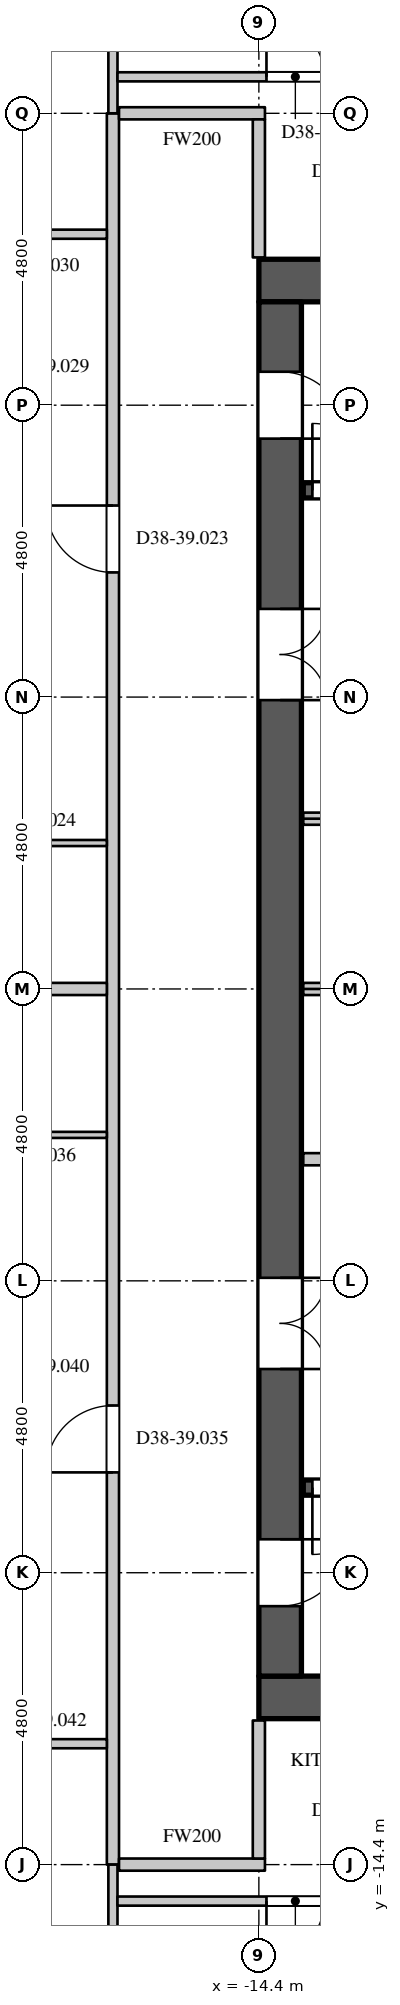
"""IFC4 building model, lengths in metres.
Left out: names, types, materials, properties, quantities, classifications, styles, units other than length and angle.
Written with IfcOpenShell. Run it as: python <this file> out.ifc"""

import sys

from ifc_helpers import new_model, si_unit, direction, frame, frame_2d, origin, place, context, subcontext, project, spatial, rectangle, extrude, element, fill, save


model = new_model("IFC4")
c1 = context("Model", 3, precision=1e-05, world=origin(), true_north=direction((0.0, 1.0)))
c2 = subcontext(c1, "Body", "Model", "MODEL_VIEW")
j1 = project(units=[si_unit("LENGTHUNIT", "METRE"), si_unit("PLANEANGLEUNIT", "RADIAN")], contexts=[c1])
p1 = place(None, origin())
s1 = spatial("IfcSite", under=j1, at=p1, CompositionType="ELEMENT")
p2 = place(p1, origin())
s2 = spatial("IfcBuilding", under=s1, at=p2, CompositionType="ELEMENT")
p3 = place(p2, frame((0.0, 0.0, 166.5)))
s3 = spatial("IfcBuildingStorey", under=s2, at=p3, CompositionType="ELEMENT", Elevation=166.5)
for number, where, z_axis, x_axis in (
    (1, (-14.4, 11.65, 0.0), (0.0, 0.0, 1.0), (1.0, 0.0, 0.0)),
    (2, (-14.4, -11.65, 0.0), (0.0, 0.0, 1.0), (1.0, 0.0, 0.0)),
):
    element("IfcWall", number, at=place(p3, frame(where, z_axis=z_axis, x_axis=x_axis)), inside=s3, PredefinedType="SHEAR", context=c2, shape_type="SweptSolid", body=[
        extrude(rectangle(XDim=28.8, YDim=0.7, at=frame_2d((14.4, 0.0))), origin(), (0.0, 0.0, 1.0), 4.2),
    ])
p4 = place(p3, frame((-14.05, -11.3, 0.0), z_axis=(0.0, 0.0, 1.0), x_axis=(0.0, 1.0, 0.0)))
e3 = element("IfcWall", 3, at=p4, inside=s3, PredefinedType="SHEAR", context=c2, shape_type="SweptSolid", body=[
    extrude(rectangle(XDim=22.6, YDim=0.7, at=frame_2d((11.3, 0.0))), origin(), (0.0, 0.0, 1.0), 4.2),
])
p5 = place(p4, frame((20.35, 0.0, 0.0)))
e4 = element("IfcOpeningElement", 4, at=p5, cuts=e3, PredefinedType="OPENING", context=c2, shape_type="SweptSolid", body=[
    extrude(rectangle(XDim=1.1, YDim=2.2, at=frame_2d((0.55, 1.1))), frame((0.0, 0.36, 0.0), z_axis=(0.0, -1.0, 0.0), x_axis=(1.0, 0.0, 0.0)), (0.0, 0.0, 1.0), 0.72),
])
p6 = place(p4, frame((1.15, 0.0, 0.0)))
e5 = element("IfcOpeningElement", 5, at=p6, cuts=e3, PredefinedType="OPENING", context=c2, shape_type="SweptSolid", body=[
    extrude(rectangle(XDim=1.1, YDim=2.2, at=frame_2d((0.55, 1.1))), frame((0.0, 0.36, 0.0), z_axis=(0.0, -1.0, 0.0), x_axis=(1.0, 0.0, 0.0)), (0.0, 0.0, 1.0), 0.72),
])
p7 = place(p4, frame((16.05, 0.0, 0.0)))
e6 = element("IfcOpeningElement", 6, at=p7, cuts=e3, PredefinedType="OPENING", context=c2, shape_type="SweptSolid", body=[
    extrude(rectangle(XDim=1.5, YDim=2.4, at=frame_2d((0.75, 1.2))), frame((0.0, 0.36, 0.0), z_axis=(0.0, -1.0, 0.0), x_axis=(1.0, 0.0, 0.0)), (0.0, 0.0, 1.0), 0.72),
])
p8 = place(p4, frame((5.05, 0.0, 0.0)))
e7 = element("IfcOpeningElement", 7, at=p8, cuts=e3, PredefinedType="OPENING", context=c2, shape_type="SweptSolid", body=[
    extrude(rectangle(XDim=1.5, YDim=2.4, at=frame_2d((0.75, 1.2))), frame((0.0, 0.36, 0.0), z_axis=(0.0, -1.0, 0.0), x_axis=(1.0, 0.0, 0.0)), (0.0, 0.0, 1.0), 0.72),
])
p9 = place(p3, frame((-16.8, -14.4, 0.0), z_axis=(0.0, 0.0, 1.0), x_axis=(0.0, 1.0, 0.0)))
e8 = element("IfcWall", 8, at=p9, inside=s3, PredefinedType="PARTITIONING", context=c2, shape_type="SweptSolid", body=[
    extrude(rectangle(XDim=28.8, YDim=0.2, at=frame_2d((14.4, 0.0))), origin(), (0.0, 0.0, 1.0), 3.95),
])
p10 = place(p9, frame((21.25, 0.0, 0.0)))
e9 = element("IfcOpeningElement", 9, at=p10, cuts=e8, PredefinedType="OPENING", context=c2, shape_type="SweptSolid", body=[
    extrude(rectangle(XDim=1.1, YDim=2.4, at=frame_2d((0.55, 1.2))), frame((0.0, 0.11, 0.0), z_axis=(0.0, -1.0, 0.0), x_axis=(1.0, 0.0, 0.0)), (0.0, 0.0, 1.0), 0.22),
])
p11 = place(p9, frame((6.45, 0.0, 0.0)))
e10 = element("IfcOpeningElement", 10, at=p11, cuts=e8, PredefinedType="OPENING", context=c2, shape_type="SweptSolid", body=[
    extrude(rectangle(XDim=1.1, YDim=2.4, at=frame_2d((0.55, 1.2))), frame((0.0, 0.11, 0.0), z_axis=(0.0, -1.0, 0.0), x_axis=(1.0, 0.0, 0.0)), (0.0, 0.0, 1.0), 0.22),
])
for number, where, z_axis, x_axis in (
    (11, (-16.7, -14.4, 0.0), (0.0, 0.0, 1.0), (1.0, 0.0, 0.0)),
    (12, (-16.7, 14.4, 0.0), (0.0, 0.0, 1.0), (1.0, 0.0, 0.0)),
):
    element("IfcWall", number, at=place(p3, frame(where, z_axis=z_axis, x_axis=x_axis)), inside=s3, PredefinedType="PARTITIONING", context=c2, shape_type="SweptSolid", body=[
        extrude(rectangle(XDim=2.4, YDim=0.2, at=frame_2d((1.2, 0.0))), origin(), (0.0, 0.0, 1.0), 3.95),
    ])
for number, where, z_axis, x_axis in (
    (13, (-14.4, -14.3, 0.0), (0.0, 0.0, 1.0), (0.0, 1.0, 0.0)),
    (14, (-14.4, 12.03, 0.0), (0.0, 0.0, 1.0), (0.0, 1.0, 0.0)),
):
    element("IfcWall", number, at=place(p3, frame(where, z_axis=z_axis, x_axis=x_axis)), inside=s3, PredefinedType="PARTITIONING", context=c2, shape_type="SweptSolid", body=[
        extrude(rectangle(XDim=2.27, YDim=0.2, at=frame_2d((1.135, 0.0))), origin(), (0.0, 0.0, 1.0), 3.95),
    ])
p12 = place(p3, frame((-22.538, -12.412, 0.0), z_axis=(0.0, 0.0, 1.0), x_axis=(1.0, 0.0, 0.0)))
e15 = element("IfcWall", 15, at=p12, inside=s3, PredefinedType="PARTITIONING", context=c2, shape_type="SweptSolid", body=[
    extrude(rectangle(XDim=5.638, YDim=0.15, at=frame_2d((2.819, 0.0))), origin(), (0.0, 0.0, 1.0), 3.95),
])
p13 = place(p12, frame((3.419, 0.0, 0.0)))
e16 = element("IfcOpeningElement", 16, at=p13, cuts=e15, PredefinedType="OPENING", context=c2, shape_type="SweptSolid", body=[
    extrude(rectangle(XDim=0.95, YDim=2.2, at=frame_2d((0.475, 1.1))), frame((0.0, 0.085, 0.0), z_axis=(0.0, -1.0, 0.0), x_axis=(1.0, 0.0, 0.0)), (0.0, 0.0, 1.0), 0.17),
])
p14 = place(p3, frame((-22.538, 12.412, 0.0), z_axis=(0.0, 0.0, 1.0), x_axis=(1.0, 0.0, 0.0)))
e17 = element("IfcWall", 17, at=p14, inside=s3, PredefinedType="PARTITIONING", context=c2, shape_type="SweptSolid", body=[
    extrude(rectangle(XDim=5.638, YDim=0.15, at=frame_2d((2.819, 0.0))), origin(), (0.0, 0.0, 1.0), 3.95),
])
p15 = place(p14, frame((3.419, 0.0, 0.0)))
e18 = element("IfcOpeningElement", 18, at=p15, cuts=e17, PredefinedType="OPENING", context=c2, shape_type="SweptSolid", body=[
    extrude(rectangle(XDim=0.95, YDim=2.2, at=frame_2d((0.475, 1.1))), frame((0.0, 0.085, 0.0), z_axis=(0.0, -1.0, 0.0), x_axis=(1.0, 0.0, 0.0)), (0.0, 0.0, 1.0), 0.17),
])
p16 = place(p3, frame((-16.8, -18.131, 0.0), z_axis=(0.0, 0.0, 1.0), x_axis=(0.0, 1.0, 0.0)))
e19 = element("IfcWall", 19, at=p16, inside=s3, PredefinedType="PARTITIONING", context=c2, shape_type="SweptSolid", body=[
    extrude(rectangle(XDim=3.731, YDim=0.15, at=frame_2d((1.865, 0.0))), origin(), (0.0, 0.0, 1.0), 3.95),
])
p17 = place(p16, frame((1.15, 0.0, 0.0)))
e20 = element("IfcOpeningElement", 20, at=p17, cuts=e19, PredefinedType="OPENING", context=c2, shape_type="SweptSolid", body=[
    extrude(rectangle(XDim=0.95, YDim=2.2, at=frame_2d((0.475, 1.1))), frame((0.0, 0.085, 0.0), z_axis=(0.0, -1.0, 0.0), x_axis=(1.0, 0.0, 0.0)), (0.0, 0.0, 1.0), 0.17),
])
p18 = place(p3, frame((-16.725, -15.0, 0.0), z_axis=(0.0, 0.0, 1.0), x_axis=(1.0, 0.0, 0.0)))
e21 = element("IfcWall", 21, at=p18, inside=s3, PredefinedType="PARTITIONING", context=c2, shape_type="SweptSolid", body=[
    extrude(rectangle(XDim=5.051, YDim=0.15, at=frame_2d((2.525, 0.0))), origin(), (0.0, 0.0, 1.0), 3.95),
])
p19 = place(p18, frame((2.45, 0.0, 0.0)))
e22 = element("IfcOpeningElement", 22, at=p19, cuts=e21, PredefinedType="OPENING", context=c2, shape_type="SweptSolid", body=[
    extrude(rectangle(XDim=0.95, YDim=2.2, at=frame_2d((0.475, 1.1))), frame((0.0, 0.085, 0.0), z_axis=(0.0, -1.0, 0.0), x_axis=(1.0, 0.0, 0.0)), (0.0, 0.0, 1.0), 0.17),
])
p20 = place(p3, frame((-16.8, 14.4, 0.0), z_axis=(0.0, 0.0, 1.0), x_axis=(0.0, 1.0, 0.0)))
e23 = element("IfcWall", 23, at=p20, inside=s3, PredefinedType="PARTITIONING", context=c2, shape_type="SweptSolid", body=[
    extrude(rectangle(XDim=3.731, YDim=0.15, at=frame_2d((1.865, 0.0))), origin(), (0.0, 0.0, 1.0), 3.95),
])
p21 = place(p20, frame((1.6, 0.0, 0.0)))
e24 = element("IfcOpeningElement", 24, at=p21, cuts=e23, PredefinedType="OPENING", context=c2, shape_type="SweptSolid", body=[
    extrude(rectangle(XDim=0.95, YDim=2.2, at=frame_2d((0.475, 1.1))), frame((0.0, 0.085, 0.0), z_axis=(0.0, -1.0, 0.0), x_axis=(1.0, 0.0, 0.0)), (0.0, 0.0, 1.0), 0.17),
])
p22 = place(p3, frame((-16.725, 15.0, 0.0), z_axis=(0.0, 0.0, 1.0), x_axis=(1.0, 0.0, 0.0)))
e25 = element("IfcWall", 25, at=p22, inside=s3, PredefinedType="PARTITIONING", context=c2, shape_type="SweptSolid", body=[
    extrude(rectangle(XDim=5.051, YDim=0.15, at=frame_2d((2.525, 0.0))), origin(), (0.0, 0.0, 1.0), 3.95),
])
p23 = place(p22, frame((2.45, 0.0, 0.0)))
e26 = element("IfcOpeningElement", 26, at=p23, cuts=e25, PredefinedType="OPENING", context=c2, shape_type="SweptSolid", body=[
    extrude(rectangle(XDim=0.95, YDim=2.2, at=frame_2d((0.475, 1.1))), frame((0.0, 0.085, 0.0), z_axis=(0.0, -1.0, 0.0), x_axis=(1.0, 0.0, 0.0)), (0.0, 0.0, 1.0), 0.17),
])
p24 = place(p3, frame((-24.055, 0.0, 0.0), z_axis=(0.0, 0.0, 1.0), x_axis=(1.0, 0.0, 0.0)))
e27 = element("IfcWall", 27, at=p24, inside=s3, PredefinedType="PARTITIONING", context=c2, shape_type="SweptSolid", body=[
    extrude(rectangle(XDim=7.155, YDim=0.2, at=frame_2d((3.578, 0.0))), origin(), (0.0, 0.0, 1.0), 3.95),
])
p25 = place(p3, frame((-13.67, -2.8, 0.0), z_axis=(0.0, 0.0, 1.0), x_axis=(1.0, 0.0, 0.0)))
e28 = element("IfcWall", 28, at=p25, inside=s3, PredefinedType="PARTITIONING", context=c2, shape_type="SweptSolid", body=[
    extrude(rectangle(XDim=3.27, YDim=0.2, at=frame_2d((1.635, 0.0))), origin(), (0.0, 0.0, 1.0), 3.95),
])
p26 = place(p25, frame((1.3, 0.0, 0.0)))
e29 = element("IfcOpeningElement", 29, at=p26, cuts=e28, PredefinedType="OPENING", context=c2, shape_type="SweptSolid", body=[
    extrude(rectangle(XDim=0.6, YDim=2.0, at=frame_2d((0.3, 1.0))), frame((0.0, 0.11, 0.0), z_axis=(0.0, -1.0, 0.0), x_axis=(1.0, 0.0, 0.0)), (0.0, 0.0, 1.0), 0.22),
])
p27 = place(p3, frame((-13.67, 0.0, 0.0), z_axis=(0.0, 0.0, 1.0), x_axis=(1.0, 0.0, 0.0)))
e30 = element("IfcWall", 30, at=p27, inside=s3, PredefinedType="PARTITIONING", context=c2, shape_type="SweptSolid", body=[
    extrude(rectangle(XDim=21.47, YDim=0.2, at=frame_2d((10.735, 0.0))), origin(), (0.0, 0.0, 1.0), 3.95),
])
p28 = place(p3, frame((-13.67, 2.8, 0.0), z_axis=(0.0, 0.0, 1.0), x_axis=(1.0, 0.0, 0.0)))
e31 = element("IfcWall", 31, at=p28, inside=s3, PredefinedType="PARTITIONING", context=c2, shape_type="SweptSolid", body=[
    extrude(rectangle(XDim=5.85, YDim=0.2, at=frame_2d((2.925, 0.0))), origin(), (0.0, 0.0, 1.0), 3.95),
])
p29 = place(p28, frame((1.05, 0.0, 0.0)))
e32 = element("IfcOpeningElement", 32, at=p29, cuts=e31, PredefinedType="OPENING", context=c2, shape_type="SweptSolid", body=[
    extrude(rectangle(XDim=1.1, YDim=2.2, at=frame_2d((0.55, 1.1))), frame((0.0, 0.11, 0.0), z_axis=(0.0, -1.0, 0.0), x_axis=(1.0, 0.0, 0.0)), (0.0, 0.0, 1.0), 0.22),
])
p30 = place(p28, frame((4.0, 0.0, 0.0)))
e33 = element("IfcOpeningElement", 33, at=p30, cuts=e31, PredefinedType="OPENING", context=c2, shape_type="SweptSolid", body=[
    extrude(rectangle(XDim=1.1, YDim=2.2, at=frame_2d((0.55, 1.1))), frame((0.0, 0.11, 0.0), z_axis=(0.0, -1.0, 0.0), x_axis=(1.0, 0.0, 0.0)), (0.0, 0.0, 1.0), 0.22),
])
p31 = place(p3, frame((-13.67, -8.2, 0.0), z_axis=(0.0, 0.0, 1.0), x_axis=(1.0, 0.0, 0.0)))
e34 = element("IfcWall", 34, at=p31, inside=s3, PredefinedType="SHEAR", context=c2, shape_type="SweptSolid", body=[
    extrude(rectangle(XDim=8.395, YDim=0.25, at=frame_2d((4.198, 0.0))), origin(), (0.0, 0.0, 1.0), 3.95),
])
p32 = place(p31, frame((0.15, 0.0, 0.0)))
e35 = element("IfcOpeningElement", 35, at=p32, cuts=e34, PredefinedType="OPENING", context=c2, shape_type="SweptSolid", body=[
    extrude(rectangle(XDim=1.1, YDim=2.2, at=frame_2d((0.55, 1.1))), frame((0.0, 0.135, 0.0), z_axis=(0.0, -1.0, 0.0), x_axis=(1.0, 0.0, 0.0)), (0.0, 0.0, 1.0), 0.27),
])
p33 = place(p3, frame((-13.67, 8.2, 0.0), z_axis=(0.0, 0.0, 1.0), x_axis=(1.0, 0.0, 0.0)))
e36 = element("IfcWall", 36, at=p33, inside=s3, PredefinedType="SHEAR", context=c2, shape_type="SweptSolid", body=[
    extrude(rectangle(XDim=8.395, YDim=0.25, at=frame_2d((4.198, 0.0))), origin(), (0.0, 0.0, 1.0), 3.95),
])
p34 = place(p33, frame((0.15, 0.0, 0.0)))
e37 = element("IfcOpeningElement", 37, at=p34, cuts=e36, PredefinedType="OPENING", context=c2, shape_type="SweptSolid", body=[
    extrude(rectangle(XDim=1.1, YDim=2.2, at=frame_2d((0.55, 1.1))), frame((0.0, 0.135, 0.0), z_axis=(0.0, -1.0, 0.0), x_axis=(1.0, 0.0, 0.0)), (0.0, 0.0, 1.0), 0.27),
])
p35 = place(p3, frame((-20.125, -2.4, 0.0), z_axis=(0.0, 0.0, 1.0), x_axis=(1.0, 0.0, 0.0)))
e38 = element("IfcWall", 38, at=p35, inside=s3, PredefinedType="PARTITIONING", context=c2, shape_type="SweptSolid", body=[
    extrude(rectangle(XDim=3.225, YDim=0.1, at=frame_2d((1.613, 0.0))), origin(), (0.0, 0.0, 1.0), 3.95),
])
p36 = place(p35, frame((1.15, 0.0, 0.0)))
e39 = element("IfcOpeningElement", 39, at=p36, cuts=e38, PredefinedType="OPENING", context=c2, shape_type="SweptSolid", body=[
    extrude(rectangle(XDim=0.9, YDim=2.2, at=frame_2d((0.45, 1.1))), frame((0.0, 0.06, 0.0), z_axis=(0.0, -1.0, 0.0), x_axis=(1.0, 0.0, 0.0)), (0.0, 0.0, 1.0), 0.12),
])
p37 = place(p3, frame((-20.125, 2.4, 0.0), z_axis=(0.0, 0.0, 1.0), x_axis=(1.0, 0.0, 0.0)))
e40 = element("IfcWall", 40, at=p37, inside=s3, PredefinedType="PARTITIONING", context=c2, shape_type="SweptSolid", body=[
    extrude(rectangle(XDim=3.225, YDim=0.1, at=frame_2d((1.613, 0.0))), origin(), (0.0, 0.0, 1.0), 3.95),
])
p38 = place(p37, frame((1.15, 0.0, 0.0)))
e41 = element("IfcOpeningElement", 41, at=p38, cuts=e40, PredefinedType="OPENING", context=c2, shape_type="SweptSolid", body=[
    extrude(rectangle(XDim=0.9, YDim=2.2, at=frame_2d((0.45, 1.1))), frame((0.0, 0.06, 0.0), z_axis=(0.0, -1.0, 0.0), x_axis=(1.0, 0.0, 0.0)), (0.0, 0.0, 1.0), 0.12),
])
p39 = place(p34, origin())
e42 = element("IfcDoor", 42, at=p39, inside=s3, OperationType="SINGLE_SWING_LEFT", PredefinedType="DOOR", context=c2, shape_type="SweptSolid", body=[
    extrude(rectangle(XDim=1.1, YDim=2.2, at=frame_2d((0.55, 1.1))), frame((0.0, 0.025, 0.0), z_axis=(0.0, -1.0, 0.0), x_axis=(1.0, 0.0, 0.0)), (0.0, 0.0, 1.0), 0.05),
])
fill(e37, e42)
p40 = place(p32, origin())
e43 = element("IfcDoor", 43, at=p40, inside=s3, OperationType="SINGLE_SWING_RIGHT", PredefinedType="DOOR", context=c2, shape_type="SweptSolid", body=[
    extrude(rectangle(XDim=1.1, YDim=2.2, at=frame_2d((0.55, 1.1))), frame((0.0, 0.025, 0.0), z_axis=(0.0, -1.0, 0.0), x_axis=(1.0, 0.0, 0.0)), (0.0, 0.0, 1.0), 0.05),
])
fill(e35, e43)
p41 = place(p5, origin())
e44 = element("IfcDoor", 44, at=p41, inside=s3, OperationType="SINGLE_SWING_RIGHT", PredefinedType="DOOR", context=c2, shape_type="SweptSolid", body=[
    extrude(rectangle(XDim=1.1, YDim=2.2, at=frame_2d((0.55, 1.1))), frame((0.0, -0.295, 0.0), z_axis=(0.0, -1.0, 0.0), x_axis=(1.0, 0.0, 0.0)), (0.0, 0.0, 1.0), 0.05),
])
fill(e4, e44)
p42 = place(p6, origin())
e45 = element("IfcDoor", 45, at=p42, inside=s3, OperationType="SINGLE_SWING_LEFT", PredefinedType="DOOR", context=c2, shape_type="SweptSolid", body=[
    extrude(rectangle(XDim=1.1, YDim=2.2, at=frame_2d((0.55, 1.1))), frame((0.0, -0.295, 0.0), z_axis=(0.0, -1.0, 0.0), x_axis=(1.0, 0.0, 0.0)), (0.0, 0.0, 1.0), 0.05),
])
fill(e5, e45)
p43 = place(p7, origin())
e46 = element("IfcDoor", 46, at=p43, inside=s3, OperationType="DOUBLE_DOOR_SINGLE_SWING", PredefinedType="DOOR", context=c2, shape_type="SweptSolid", body=[
    extrude(rectangle(XDim=1.5, YDim=2.4, at=frame_2d((0.75, 1.2))), frame((0.0, -0.295, 0.0), z_axis=(0.0, -1.0, 0.0), x_axis=(1.0, 0.0, 0.0)), (0.0, 0.0, 1.0), 0.05),
])
fill(e6, e46)
p44 = place(p8, origin())
e47 = element("IfcDoor", 47, at=p44, inside=s3, OperationType="DOUBLE_DOOR_SINGLE_SWING", PredefinedType="DOOR", context=c2, shape_type="SweptSolid", body=[
    extrude(rectangle(XDim=1.5, YDim=2.4, at=frame_2d((0.75, 1.2))), frame((0.0, -0.295, 0.0), z_axis=(0.0, -1.0, 0.0), x_axis=(1.0, 0.0, 0.0)), (0.0, 0.0, 1.0), 0.05),
])
fill(e7, e47)
p45 = place(p10, origin())
e48 = element("IfcDoor", 48, at=p45, inside=s3, OperationType="SINGLE_SWING_RIGHT", PredefinedType="DOOR", context=c2, shape_type="SweptSolid", body=[
    extrude(rectangle(XDim=1.1, YDim=2.4, at=frame_2d((0.55, 1.2))), frame((0.0, 0.025, 0.0), z_axis=(0.0, -1.0, 0.0), x_axis=(1.0, 0.0, 0.0)), (0.0, 0.0, 1.0), 0.05),
])
fill(e9, e48)
p46 = place(p23, origin())
e49 = element("IfcDoor", 49, at=p46, inside=s3, OperationType="SINGLE_SWING_LEFT", PredefinedType="DOOR", context=c2, shape_type="SweptSolid", body=[
    extrude(rectangle(XDim=0.95, YDim=2.2, at=frame_2d((0.475, 1.1))), frame((0.0, 0.025, 0.0), z_axis=(0.0, -1.0, 0.0), x_axis=(1.0, 0.0, 0.0)), (0.0, 0.0, 1.0), 0.05),
])
fill(e26, e49)
p47 = place(p11, origin())
e50 = element("IfcDoor", 50, at=p47, inside=s3, OperationType="SINGLE_SWING_LEFT", PredefinedType="DOOR", context=c2, shape_type="SweptSolid", body=[
    extrude(rectangle(XDim=1.1, YDim=2.4, at=frame_2d((0.55, 1.2))), frame((0.0, 0.025, 0.0), z_axis=(0.0, -1.0, 0.0), x_axis=(1.0, 0.0, 0.0)), (0.0, 0.0, 1.0), 0.05),
])
fill(e10, e50)
p48 = place(p19, origin())
e51 = element("IfcDoor", 51, at=p48, inside=s3, OperationType="SINGLE_SWING_RIGHT", PredefinedType="DOOR", context=c2, shape_type="SweptSolid", body=[
    extrude(rectangle(XDim=0.95, YDim=2.2, at=frame_2d((0.475, 1.1))), frame((0.0, 0.025, 0.0), z_axis=(0.0, -1.0, 0.0), x_axis=(1.0, 0.0, 0.0)), (0.0, 0.0, 1.0), 0.05),
])
fill(e22, e51)
save(model, sys.argv[1])
